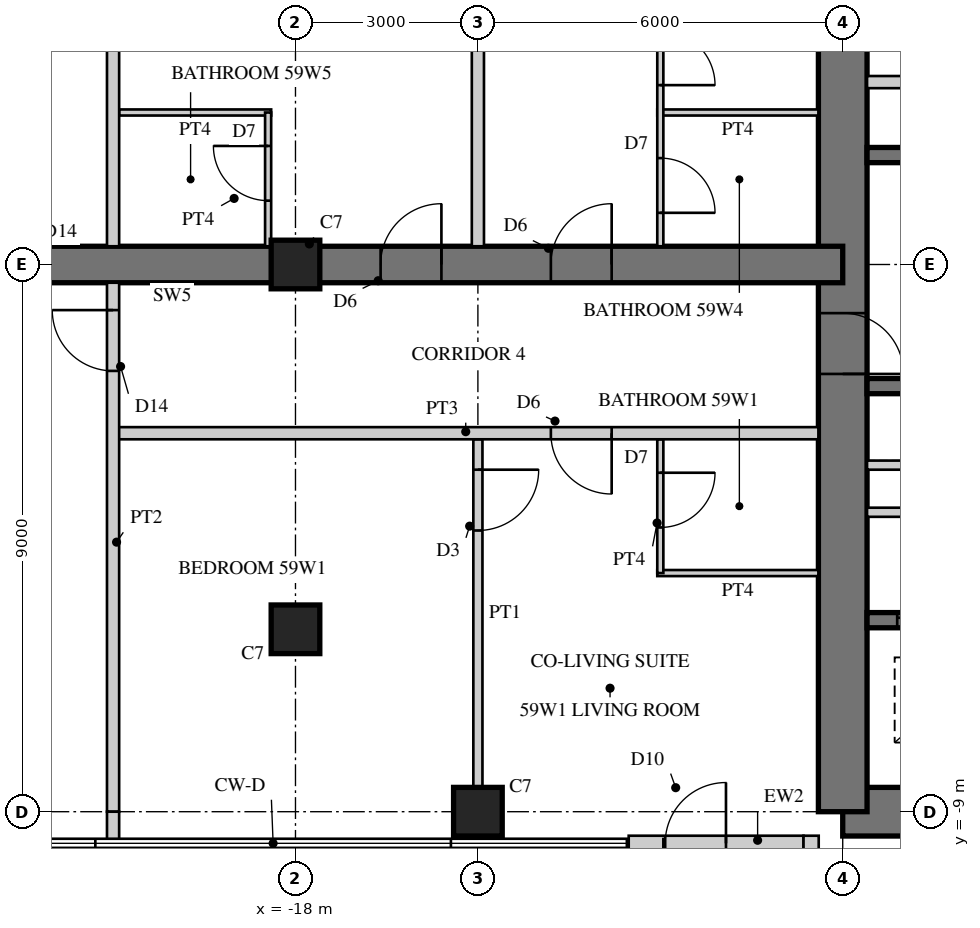
"""IFC4 building model, lengths in metres.
Left out: names, types, materials, properties, quantities, classifications, styles, units other than length and angle.
Written with IfcOpenShell. Run it as: python <this file> out.ifc"""

import sys

from ifc_helpers import new_model, si_unit, direction, frame, frame_2d, origin, origin_2d, place, context, subcontext, project, spatial, rectangle, hollow_rectangle, extrude, element, fill, save


model = new_model("IFC4")
c1 = context("Model", 3, precision=1e-05, world=origin(), true_north=direction((0.0, 1.0)))
c2 = subcontext(c1, "Body", "Model", "MODEL_VIEW")
j1 = project(units=[si_unit("LENGTHUNIT", "METRE"), si_unit("PLANEANGLEUNIT", "RADIAN")], contexts=[c1])
p1 = place(None, origin())
s1 = spatial("IfcSite", under=j1, at=p1, CompositionType="ELEMENT")
p2 = place(p1, origin())
s2 = spatial("IfcBuilding", under=s1, at=p2, CompositionType="ELEMENT")
p3 = place(p2, frame((0.0, 0.0, 232.3)))
s3 = spatial("IfcBuildingStorey", under=s2, at=p3, CompositionType="ELEMENT", Elevation=232.3)
p4 = place(p3, frame((-9.0, -9.0, 0.0), z_axis=(0.0, 0.0, 1.0), x_axis=(1.0, 0.0, 0.0)))
e1 = element("IfcWall", 1, at=p4, inside=s3, PredefinedType="SHEAR", context=c2, shape_type="SweptSolid", body=[
    extrude(rectangle(XDim=18.0, YDim=0.8, at=frame_2d((9.0, 0.0))), origin(), (0.0, 0.0, 1.0), 3.4),
])
p5 = place(p4, frame((9.8, 0.0, 0.0)))
e2 = element("IfcOpeningElement", 2, at=p5, cuts=e1, PredefinedType="OPENING", context=c2, shape_type="SweptSolid", body=[
    extrude(rectangle(XDim=1.0, YDim=2.4, at=frame_2d((0.5, 1.2))), frame((0.0, 0.41, 0.0), z_axis=(0.0, -1.0, 0.0), x_axis=(1.0, 0.0, 0.0)), (0.0, 0.0, 1.0), 0.82),
])
p6 = place(p3, frame((-9.0, 9.0, 0.0), z_axis=(0.0, 0.0, 1.0), x_axis=(0.0, -1.0, 0.0)))
e3 = element("IfcWall", 3, at=p6, inside=s3, PredefinedType="SHEAR", context=c2, shape_type="SweptSolid", body=[
    extrude(rectangle(XDim=18.0, YDim=0.8, at=frame_2d((9.0, 0.0))), origin(), (0.0, 0.0, 1.0), 3.4),
])
p7 = place(p6, frame((9.8, 0.0, 0.0)))
e4 = element("IfcOpeningElement", 4, at=p7, cuts=e3, PredefinedType="OPENING", context=c2, shape_type="SweptSolid", body=[
    extrude(rectangle(XDim=1.0, YDim=2.4, at=frame_2d((0.5, 1.2))), frame((0.0, 0.41, 0.0), z_axis=(0.0, -1.0, 0.0), x_axis=(1.0, 0.0, 0.0)), (0.0, 0.0, 1.0), 0.82),
])
p8 = place(p3, frame((-2.125, 1.8, 0.0), z_axis=(0.0, 0.0, 1.0), x_axis=(-1.0, 0.0, 0.0)))
e5 = element("IfcWall", 5, at=p8, inside=s3, PredefinedType="SHEAR", context=c2, shape_type="SweptSolid", body=[
    extrude(rectangle(XDim=6.475, YDim=0.25, at=frame_2d((3.238, 0.0))), origin(), (0.0, 0.0, 1.0), 3.4),
])
p9 = place(p3, frame((-5.725, 3.0, 0.0), z_axis=(0.0, 0.0, 1.0), x_axis=(-1.0, 0.0, 0.0)))
e6 = element("IfcWall", 6, at=p9, inside=s3, PredefinedType="PARTITIONING", context=c2, shape_type="SweptSolid", body=[
    extrude(rectangle(XDim=2.875, YDim=0.2, at=frame_2d((1.438, 0.0))), origin(), (0.0, 0.0, 1.0), 3.4),
])
p10 = place(p3, frame((-1.925, -2.0, 0.0), z_axis=(0.0, 0.0, 1.0), x_axis=(-1.0, 0.0, 0.0)))
e7 = element("IfcWall", 7, at=p10, inside=s3, PredefinedType="SHEAR", context=c2, shape_type="SweptSolid", body=[
    extrude(rectangle(XDim=6.675, YDim=0.25, at=frame_2d((3.337, 0.0))), origin(), (0.0, 0.0, 1.0), 3.4),
])
p11 = place(p3, frame((-1.925, -5.85, 0.0), z_axis=(0.0, 0.0, 1.0), x_axis=(-1.0, 0.0, 0.0)))
e8 = element("IfcWall", 8, at=p11, inside=s3, PredefinedType="SHEAR", context=c2, shape_type="SweptSolid", body=[
    extrude(rectangle(XDim=6.675, YDim=0.25, at=frame_2d((3.337, 0.0))), origin(), (0.0, 0.0, 1.0), 3.4),
])
p12 = place(p11, frame((0.496, 0.0, 0.0)))
e9 = element("IfcOpeningElement", 9, at=p12, cuts=e8, PredefinedType="OPENING", context=c2, shape_type="SweptSolid", body=[
    extrude(rectangle(XDim=1.1, YDim=2.2, at=frame_2d((0.55, 1.1))), frame((0.0, 0.135, 0.0), z_axis=(0.0, -1.0, 0.0), x_axis=(1.0, 0.0, 0.0)), (0.0, 0.0, 1.0), 0.27),
])
p13 = place(p11, frame((2.788, 0.0, 0.0)))
e10 = element("IfcOpeningElement", 10, at=p13, cuts=e8, PredefinedType="OPENING", context=c2, shape_type="SweptSolid", body=[
    extrude(rectangle(XDim=1.1, YDim=2.2, at=frame_2d((0.55, 1.1))), frame((0.0, 0.135, 0.0), z_axis=(0.0, -1.0, 0.0), x_axis=(1.0, 0.0, 0.0)), (0.0, 0.0, 1.0), 0.27),
])
p14 = place(p11, frame((5.079, 0.0, 0.0)))
e11 = element("IfcOpeningElement", 11, at=p14, cuts=e8, PredefinedType="OPENING", context=c2, shape_type="SweptSolid", body=[
    extrude(rectangle(XDim=1.1, YDim=2.2, at=frame_2d((0.55, 1.1))), frame((0.0, 0.135, 0.0), z_axis=(0.0, -1.0, 0.0), x_axis=(1.0, 0.0, 0.0)), (0.0, 0.0, 1.0), 0.27),
])
p15 = place(p3, frame((-1.925, -3.3, 0.0), z_axis=(0.0, 0.0, 1.0), x_axis=(-1.0, 0.0, 0.0)))
e12 = element("IfcWall", 12, at=p15, inside=s3, PredefinedType="PARTITIONING", context=c2, shape_type="SweptSolid", body=[
    extrude(rectangle(XDim=6.675, YDim=0.15, at=frame_2d((3.337, 0.0))), origin(), (0.0, 0.0, 1.0), 3.4),
])
p16 = place(p15, frame((0.075, 0.0, 0.0)))
e13 = element("IfcOpeningElement", 13, at=p16, cuts=e12, PredefinedType="OPENING", context=c2, shape_type="SweptSolid", body=[
    extrude(rectangle(XDim=0.8, YDim=2.1, at=frame_2d((0.4, 1.05))), frame((0.0, 0.085, 0.0), z_axis=(0.0, -1.0, 0.0), x_axis=(1.0, 0.0, 0.0)), (0.0, 0.0, 1.0), 0.17),
])
p17 = place(p15, frame((3.675, 0.0, 0.0)))
e14 = element("IfcOpeningElement", 14, at=p17, cuts=e12, PredefinedType="OPENING", context=c2, shape_type="SweptSolid", body=[
    extrude(rectangle(XDim=0.8, YDim=2.1, at=frame_2d((0.4, 1.05))), frame((0.0, 0.085, 0.0), z_axis=(0.0, -1.0, 0.0), x_axis=(1.0, 0.0, 0.0)), (0.0, 0.0, 1.0), 0.17),
])
p18 = place(p3, frame((-9.0, 0.0, 0.0), z_axis=(0.0, 0.0, 1.0), x_axis=(-1.0, 0.0, 0.0)))
e15 = element("IfcWall", 15, at=p18, inside=s3, PredefinedType="SHEAR", context=c2, shape_type="SweptSolid", body=[
    extrude(rectangle(XDim=18.0, YDim=0.6, at=frame_2d((9.0, 0.0))), origin(), (0.0, 0.0, 1.0), 3.4),
])
p19 = place(p18, frame((3.8, 0.0, 0.0)))
e16 = element("IfcOpeningElement", 16, at=p19, cuts=e15, PredefinedType="OPENING", context=c2, shape_type="SweptSolid", body=[
    extrude(rectangle(XDim=1.0, YDim=2.15, at=frame_2d((0.5, 1.075))), frame((0.0, 0.31, 0.0), z_axis=(0.0, -1.0, 0.0), x_axis=(1.0, 0.0, 0.0)), (0.0, 0.0, 1.0), 0.62),
])
p20 = place(p18, frame((6.6, 0.0, 0.0)))
e17 = element("IfcOpeningElement", 17, at=p20, cuts=e15, PredefinedType="OPENING", context=c2, shape_type="SweptSolid", body=[
    extrude(rectangle(XDim=1.0, YDim=2.15, at=frame_2d((0.5, 1.075))), frame((0.0, 0.31, 0.0), z_axis=(0.0, -1.0, 0.0), x_axis=(1.0, 0.0, 0.0)), (0.0, 0.0, 1.0), 0.62),
])
p21 = place(p18, frame((13.3, 0.0, 0.0)))
e18 = element("IfcOpeningElement", 18, at=p21, cuts=e15, PredefinedType="OPENING", context=c2, shape_type="SweptSolid", body=[
    extrude(rectangle(XDim=1.0, YDim=2.2, at=frame_2d((0.5, 1.1))), frame((0.0, 0.31, 0.0), z_axis=(0.0, -1.0, 0.0), x_axis=(1.0, 0.0, 0.0)), (0.0, 0.0, 1.0), 0.62),
])
for number, where, z_axis, x_axis in (
    (19, (-15.0, -9.0, 0.0), (0.0, 0.0, 1.0), (1.0, 0.0, 0.0)),
    (20, (-18.0, 0.0, 0.0), (0.0, 0.0, 1.0), (1.0, 0.0, 0.0)),
    (21, (-18.0, -6.0, 0.0), (0.0, 0.0, 1.0), (1.0, 0.0, 0.0)),
):
    element("IfcColumn", number, at=place(p3, frame(where, z_axis=z_axis, x_axis=x_axis)), inside=s3, PredefinedType="COLUMN", context=c2, shape_type="SweptSolid", body=[
        extrude(rectangle(XDim=0.8, YDim=0.8, at=origin_2d()), origin(), (0.0, 0.0, 1.0), 3.4),
    ])
p22 = place(p3, frame((-12.52, -9.52, 0.0), z_axis=(0.0, 0.0, 1.0), x_axis=(1.0, 0.0, 0.0)))
e22 = element("IfcWall", 22, at=p22, inside=s3, PredefinedType="SOLIDWALL", context=c2, shape_type="SweptSolid", body=[
    extrude(rectangle(XDim=2.875, YDim=0.25, at=frame_2d((1.438, 0.0))), origin(), (0.0, 0.0, 1.0), 3.22),
])
p23 = place(p22, frame((0.6, 0.0, 0.0)))
e23 = element("IfcOpeningElement", 23, at=p23, cuts=e22, PredefinedType="OPENING", context=c2, shape_type="SweptSolid", body=[
    extrude(rectangle(XDim=1.0, YDim=2.2, at=frame_2d((0.5, 1.1))), frame((0.0, 0.135, 0.0), z_axis=(0.0, -1.0, 0.0), x_axis=(1.0, 0.0, 0.0)), (0.0, 0.0, 1.0), 0.27),
])
p24 = place(p3, frame((-9.52, -9.395, 0.0), z_axis=(0.0, 0.0, 1.0), x_axis=(0.0, -1.0, 0.0)))
e24 = element("IfcWall", 24, at=p24, inside=s3, PredefinedType="SOLIDWALL", context=c2, shape_type="SweptSolid", body=[
    extrude(rectangle(XDim=3.125, YDim=0.25, at=frame_2d((1.562, 0.0))), origin(), (0.0, 0.0, 1.0), 3.22),
])
p25 = place(p24, frame((0.6, 0.0, 0.0)))
e25 = element("IfcOpeningElement", 25, at=p25, cuts=e24, PredefinedType="OPENING", context=c2, shape_type="SweptSolid", body=[
    extrude(rectangle(XDim=1.0, YDim=2.2, at=frame_2d((0.5, 1.1))), frame((0.0, 0.135, 0.0), z_axis=(0.0, -1.0, 0.0), x_axis=(1.0, 0.0, 0.0)), (0.0, 0.0, 1.0), 0.27),
])
p26 = place(p3, frame((-3.325, -4.075, 0.0), z_axis=(0.0, 0.0, 1.0), x_axis=(-1.0, 0.0, 0.0)))
e26 = element("IfcWall", 26, at=p26, inside=s3, PredefinedType="PARTITIONING", context=c2, shape_type="SweptSolid", body=[
    extrude(rectangle(XDim=5.275, YDim=0.15, at=frame_2d((2.638, 0.0))), origin(), (0.0, 0.0, 1.0), 3.22),
])
p27 = place(p26, frame((2.137, 0.0, 0.0)))
e27 = element("IfcOpeningElement", 27, at=p27, cuts=e26, PredefinedType="OPENING", context=c2, shape_type="SweptSolid", body=[
    extrude(rectangle(XDim=1.0, YDim=2.1, at=frame_2d((0.5, 1.05))), frame((0.0, 0.085, 0.0), z_axis=(0.0, -1.0, 0.0), x_axis=(1.0, 0.0, 0.0)), (0.0, 0.0, 1.0), 0.17),
])
p28 = place(p3, frame((-9.4, -5.075, 0.0), z_axis=(0.0, 0.0, 1.0), x_axis=(-1.0, 0.0, 0.0)))
e28 = element("IfcWall", 28, at=p28, inside=s3, PredefinedType="PARTITIONING", context=c2, shape_type="SweptSolid", body=[
    extrude(rectangle(XDim=2.65, YDim=0.1, at=frame_2d((1.325, 0.0))), origin(), (0.0, 0.0, 1.0), 3.22),
])
p29 = place(p3, frame((-12.0, -2.875, 0.0), z_axis=(0.0, 0.0, 1.0), x_axis=(0.0, -1.0, 0.0)))
e29 = element("IfcWall", 29, at=p29, inside=s3, PredefinedType="PARTITIONING", context=c2, shape_type="SweptSolid", body=[
    extrude(rectangle(XDim=2.2, YDim=0.1, at=frame_2d((1.1, 0.0))), origin(), (0.0, 0.0, 1.0), 3.22),
])
p30 = place(p29, frame((0.55, 0.0, 0.0)))
e30 = element("IfcOpeningElement", 30, at=p30, cuts=e29, PredefinedType="OPENING", context=c2, shape_type="SweptSolid", body=[
    extrude(rectangle(XDim=0.9, YDim=2.1, at=frame_2d((0.45, 1.05))), frame((0.0, 0.06, 0.0), z_axis=(0.0, -1.0, 0.0), x_axis=(1.0, 0.0, 0.0)), (0.0, 0.0, 1.0), 0.12),
])
p31 = place(p3, frame((-15.0, -2.875, 0.0), z_axis=(0.0, 0.0, 1.0), x_axis=(0.0, -1.0, 0.0)))
e31 = element("IfcWall", 31, at=p31, inside=s3, PredefinedType="PARTITIONING", context=c2, shape_type="SweptSolid", body=[
    extrude(rectangle(XDim=5.725, YDim=0.15, at=frame_2d((2.863, 0.0))), origin(), (0.0, 0.0, 1.0), 2.52),
])
p32 = place(p31, frame((0.5, 0.0, 0.0)))
e32 = element("IfcOpeningElement", 32, at=p32, cuts=e31, PredefinedType="OPENING", context=c2, shape_type="SweptSolid", body=[
    extrude(rectangle(XDim=1.0, YDim=2.1, at=frame_2d((0.5, 1.05))), frame((0.0, 0.085, 0.0), z_axis=(0.0, -1.0, 0.0), x_axis=(1.0, 0.0, 0.0)), (0.0, 0.0, 1.0), 0.17),
])
p33 = place(p3, frame((-9.4, 2.5, 0.0), z_axis=(0.0, 0.0, 1.0), x_axis=(-1.0, 0.0, 0.0)))
e33 = element("IfcWall", 33, at=p33, inside=s3, PredefinedType="PARTITIONING", context=c2, shape_type="SweptSolid", body=[
    extrude(rectangle(XDim=2.65, YDim=0.1, at=frame_2d((1.325, 0.0))), origin(), (0.0, 0.0, 1.0), 3.22),
])
p34 = place(p3, frame((-12.0, 9.395, 0.0), z_axis=(0.0, 0.0, 1.0), x_axis=(0.0, -1.0, 0.0)))
e34 = element("IfcWall", 34, at=p34, inside=s3, PredefinedType="PARTITIONING", context=c2, shape_type="SweptSolid", body=[
    extrude(rectangle(XDim=9.095, YDim=0.1, at=frame_2d((4.547, 0.0))), origin(), (0.0, 0.0, 1.0), 3.22),
])
p35 = place(p34, frame((5.545, 0.0, 0.0)))
e35 = element("IfcOpeningElement", 35, at=p35, cuts=e34, PredefinedType="OPENING", context=c2, shape_type="SweptSolid", body=[
    extrude(rectangle(XDim=0.9, YDim=2.1, at=frame_2d((0.45, 1.05))), frame((0.0, 0.06, 0.0), z_axis=(0.0, -1.0, 0.0), x_axis=(1.0, 0.0, 0.0)), (0.0, 0.0, 1.0), 0.12),
])
p36 = place(p34, frame((7.645, 0.0, 0.0)))
e36 = element("IfcOpeningElement", 36, at=p36, cuts=e34, PredefinedType="OPENING", context=c2, shape_type="SweptSolid", body=[
    extrude(rectangle(XDim=0.9, YDim=2.1, at=frame_2d((0.45, 1.05))), frame((0.0, 0.06, 0.0), z_axis=(0.0, -1.0, 0.0), x_axis=(1.0, 0.0, 0.0)), (0.0, 0.0, 1.0), 0.12),
])
p37 = place(p3, frame((-15.0, 8.6, 0.0), z_axis=(0.0, 0.0, 1.0), x_axis=(0.0, -1.0, 0.0)))
e37 = element("IfcWall", 37, at=p37, inside=s3, PredefinedType="SOLIDWALL", context=c2, shape_type="SweptSolid", body=[
    extrude(rectangle(XDim=8.3, YDim=0.2, at=frame_2d((4.15, 0.0))), origin(), (0.0, 0.0, 1.0), 2.52),
])
p38 = place(p3, frame((-18.4, 2.5, 0.0), z_axis=(0.0, 0.0, 1.0), x_axis=(-1.0, 0.0, 0.0)))
e38 = element("IfcWall", 38, at=p38, inside=s3, PredefinedType="PARTITIONING", context=c2, shape_type="SweptSolid", body=[
    extrude(rectangle(XDim=2.5, YDim=0.1, at=frame_2d((1.25, 0.0))), origin(), (0.0, 0.0, 1.0), 3.22),
])
p39 = place(p3, frame((-18.45, 2.5, 0.0), z_axis=(0.0, 0.0, 1.0), x_axis=(0.0, -1.0, 0.0)))
e39 = element("IfcWall", 39, at=p39, inside=s3, PredefinedType="PARTITIONING", context=c2, shape_type="SweptSolid", body=[
    extrude(rectangle(XDim=2.2, YDim=0.1, at=frame_2d((1.1, 0.0))), origin(), (0.0, 0.0, 1.0), 3.22),
])
p40 = place(p39, frame((0.55, 0.0, 0.0)))
e40 = element("IfcOpeningElement", 40, at=p40, cuts=e39, PredefinedType="OPENING", context=c2, shape_type="SweptSolid", body=[
    extrude(rectangle(XDim=0.9, YDim=2.1, at=frame_2d((0.45, 1.05))), frame((0.0, 0.06, 0.0), z_axis=(0.0, -1.0, 0.0), x_axis=(1.0, 0.0, 0.0)), (0.0, 0.0, 1.0), 0.12),
])
p41 = place(p3, frame((-9.4, -2.775, 0.0), z_axis=(0.0, 0.0, 1.0), x_axis=(-1.0, 0.0, 0.0)))
e41 = element("IfcWall", 41, at=p41, inside=s3, PredefinedType="SOLIDWALL", context=c2, shape_type="SweptSolid", body=[
    extrude(rectangle(XDim=11.6, YDim=0.2, at=frame_2d((5.8, 0.0))), origin(), (0.0, 0.0, 1.0), 3.22),
])
p42 = place(p41, frame((3.4, 0.0, 0.0)))
e42 = element("IfcOpeningElement", 42, at=p42, cuts=e41, PredefinedType="OPENING", context=c2, shape_type="SweptSolid", body=[
    extrude(rectangle(XDim=1.0, YDim=2.15, at=frame_2d((0.5, 1.075))), frame((0.0, 0.11, 0.0), z_axis=(0.0, -1.0, 0.0), x_axis=(1.0, 0.0, 0.0)), (0.0, 0.0, 1.0), 0.22),
])
p43 = place(p3, frame((-21.0, 9.0, 0.0), z_axis=(0.0, 0.0, 1.0), x_axis=(0.0, -1.0, 0.0)))
e43 = element("IfcWall", 43, at=p43, inside=s3, PredefinedType="SOLIDWALL", context=c2, shape_type="SweptSolid", body=[
    extrude(rectangle(XDim=8.7, YDim=0.2, at=frame_2d((4.35, 0.0))), origin(), (0.0, 0.0, 1.0), 2.67),
])
p44 = place(p3, frame((-21.0, -0.3, 0.0), z_axis=(0.0, 0.0, 1.0), x_axis=(0.0, -1.0, 0.0)))
e44 = element("IfcWall", 44, at=p44, inside=s3, PredefinedType="SOLIDWALL", context=c2, shape_type="SweptSolid", body=[
    extrude(rectangle(XDim=8.7, YDim=0.2, at=frame_2d((4.35, 0.0))), origin(), (0.0, 0.0, 1.0), 2.67),
])
p45 = place(p44, frame((0.45, 0.0, 0.0)))
e45 = element("IfcOpeningElement", 45, at=p45, cuts=e44, PredefinedType="OPENING", context=c2, shape_type="SweptSolid", body=[
    extrude(rectangle(XDim=1.0, YDim=2.2, at=frame_2d((0.5, 1.1))), frame((0.0, 0.11, 0.0), z_axis=(0.0, -1.0, 0.0), x_axis=(1.0, 0.0, 0.0)), (0.0, 0.0, 1.0), 0.22),
])
p46 = place(p3, frame((-21.0, -9.0, 0.0), z_axis=(0.0, 0.0, 1.0), x_axis=(0.0, -1.0, 0.0)))
e46 = element("IfcWall", 46, at=p46, inside=s3, PredefinedType="SOLIDWALL", context=c2, shape_type="SweptSolid", body=[
    extrude(rectangle(XDim=0.48, YDim=0.2, at=frame_2d((0.24, 0.0))), origin(), (0.0, 0.0, 1.0), 3.22),
])
p47 = place(p23, origin())
e47 = element("IfcDoor", 47, at=p47, inside=s3, OperationType="SINGLE_SWING_RIGHT", PredefinedType="DOOR", context=c2, shape_type="SweptSolid", body=[
    extrude(hollow_rectangle(XDim=1.0, YDim=2.2, WallThickness=0.06, at=frame_2d((0.5, 1.1))), frame((0.0, 0.025, 0.0), z_axis=(0.0, -1.0, 0.0), x_axis=(1.0, 0.0, 0.0)), (0.0, 0.0, 1.0), 0.05),
    extrude(rectangle(XDim=0.879, YDim=2.079, at=frame_2d((0.5, 1.1))), frame((0.0, 0.025, 0.0), z_axis=(0.0, -1.0, 0.0), x_axis=(1.0, 0.0, 0.0)), (0.0, 0.0, 1.0), 0.05),
])
fill(e23, e47)
p48 = place(p30, origin())
e48 = element("IfcDoor", 48, at=p48, inside=s3, OperationType="SINGLE_SWING_LEFT", PredefinedType="DOOR", context=c2, shape_type="SweptSolid", body=[
    extrude(rectangle(XDim=0.9, YDim=2.1, at=frame_2d((0.45, 1.05))), frame((0.0, 0.025, 0.0), z_axis=(0.0, -1.0, 0.0), x_axis=(1.0, 0.0, 0.0)), (0.0, 0.0, 1.0), 0.05),
])
fill(e30, e48)
p49 = place(p32, origin())
e49 = element("IfcDoor", 49, at=p49, inside=s3, OperationType="SINGLE_SWING_LEFT", PredefinedType="DOOR", context=c2, shape_type="SweptSolid", body=[
    extrude(rectangle(XDim=1.0, YDim=2.1, at=frame_2d((0.5, 1.05))), frame((0.0, 0.025, 0.0), z_axis=(0.0, -1.0, 0.0), x_axis=(1.0, 0.0, 0.0)), (0.0, 0.0, 1.0), 0.05),
])
fill(e32, e49)
p50 = place(p35, origin())
e50 = element("IfcDoor", 50, at=p50, inside=s3, OperationType="SINGLE_SWING_RIGHT", PredefinedType="DOOR", context=c2, shape_type="SweptSolid", body=[
    extrude(rectangle(XDim=0.9, YDim=2.1, at=frame_2d((0.45, 1.05))), frame((0.0, 0.025, 0.0), z_axis=(0.0, -1.0, 0.0), x_axis=(1.0, 0.0, 0.0)), (0.0, 0.0, 1.0), 0.05),
])
fill(e35, e50)
p51 = place(p36, origin())
e51 = element("IfcDoor", 51, at=p51, inside=s3, OperationType="SINGLE_SWING_RIGHT", PredefinedType="DOOR", context=c2, shape_type="SweptSolid", body=[
    extrude(rectangle(XDim=0.9, YDim=2.1, at=frame_2d((0.45, 1.05))), frame((0.0, 0.025, 0.0), z_axis=(0.0, -1.0, 0.0), x_axis=(1.0, 0.0, 0.0)), (0.0, 0.0, 1.0), 0.05),
])
fill(e36, e51)
p52 = place(p40, frame((0.9, 0.0, 0.0), z_axis=(0.0, 0.0, 1.0), x_axis=(-1.0, 0.0, 0.0)))
e52 = element("IfcDoor", 52, at=p52, inside=s3, OperationType="SINGLE_SWING_RIGHT", PredefinedType="DOOR", context=c2, shape_type="SweptSolid", body=[
    extrude(rectangle(XDim=0.9, YDim=2.1, at=frame_2d((0.45, 1.05))), frame((0.0, 0.025, 0.0), z_axis=(0.0, -1.0, 0.0), x_axis=(1.0, 0.0, 0.0)), (0.0, 0.0, 1.0), 0.05),
])
fill(e40, e52)
p53 = place(p42, origin())
e53 = element("IfcDoor", 53, at=p53, inside=s3, OperationType="SINGLE_SWING_LEFT", PredefinedType="DOOR", context=c2, shape_type="SweptSolid", body=[
    extrude(rectangle(XDim=1.0, YDim=2.15, at=frame_2d((0.5, 1.075))), frame((0.0, 0.025, 0.0), z_axis=(0.0, -1.0, 0.0), x_axis=(1.0, 0.0, 0.0)), (0.0, 0.0, 1.0), 0.05),
])
fill(e42, e53)
p54 = place(p45, frame((1.0, 0.0, 0.0), z_axis=(0.0, 0.0, 1.0), x_axis=(-1.0, 0.0, 0.0)))
e54 = element("IfcDoor", 54, at=p54, inside=s3, OperationType="SINGLE_SWING_RIGHT", PredefinedType="DOOR", context=c2, shape_type="SweptSolid", body=[
    extrude(rectangle(XDim=1.0, YDim=2.2, at=frame_2d((0.5, 1.1))), frame((0.0, 0.025, 0.0), z_axis=(0.0, -1.0, 0.0), x_axis=(1.0, 0.0, 0.0)), (0.0, 0.0, 1.0), 0.05),
])
fill(e45, e54)
p55 = place(p19, frame((1.0, 0.0, 0.0), z_axis=(0.0, 0.0, 1.0), x_axis=(-1.0, 0.0, 0.0)))
e55 = element("IfcDoor", 55, at=p55, inside=s3, OperationType="SINGLE_SWING_RIGHT", PredefinedType="DOOR", context=c2, shape_type="SweptSolid", body=[
    extrude(rectangle(XDim=1.0, YDim=2.15, at=frame_2d((0.5, 1.075))), frame((0.0, 0.025, 0.0), z_axis=(0.0, -1.0, 0.0), x_axis=(1.0, 0.0, 0.0)), (0.0, 0.0, 1.0), 0.05),
])
fill(e16, e55)
p56 = place(p20, frame((1.0, 0.0, 0.0), z_axis=(0.0, 0.0, 1.0), x_axis=(-1.0, 0.0, 0.0)))
e56 = element("IfcDoor", 56, at=p56, inside=s3, OperationType="SINGLE_SWING_RIGHT", PredefinedType="DOOR", context=c2, shape_type="SweptSolid", body=[
    extrude(rectangle(XDim=1.0, YDim=2.15, at=frame_2d((0.5, 1.075))), frame((0.0, 0.025, 0.0), z_axis=(0.0, -1.0, 0.0), x_axis=(1.0, 0.0, 0.0)), (0.0, 0.0, 1.0), 0.05),
])
fill(e17, e56)
p57 = place(p7, origin())
e57 = element("IfcDoor", 57, at=p57, inside=s3, OperationType="SINGLE_SWING_RIGHT", PredefinedType="DOOR", context=c2, shape_type="SweptSolid", body=[
    extrude(rectangle(XDim=1.0, YDim=2.4, at=frame_2d((0.5, 1.2))), frame((0.0, 0.055, 0.0), z_axis=(0.0, -1.0, 0.0), x_axis=(1.0, 0.0, 0.0)), (0.0, 0.0, 1.0), 0.05),
])
fill(e4, e57)
p58 = place(p14, origin())
e58 = element("IfcDoor", 58, at=p58, inside=s3, OperationType="DOUBLE_DOOR_SLIDING", PredefinedType="DOOR", context=c2, shape_type="SweptSolid", body=[
    extrude(rectangle(XDim=1.1, YDim=2.2, at=frame_2d((0.55, 1.1))), frame((0.0, 0.025, 0.0), z_axis=(0.0, -1.0, 0.0), x_axis=(1.0, 0.0, 0.0)), (0.0, 0.0, 1.0), 0.05),
])
fill(e11, e58)
save(model, sys.argv[1])
